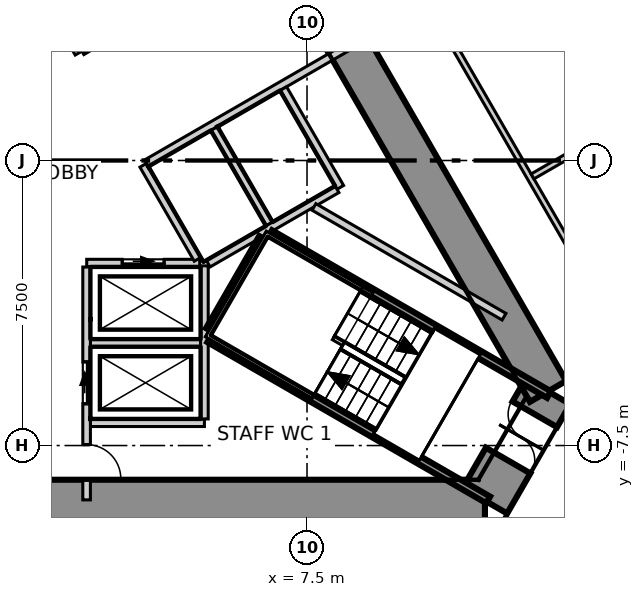
"""IFC4 building model, lengths in metres.
Left out: names, types, materials, properties, quantities, classifications, styles, units other than length and angle.
Written with IfcOpenShell. Run it as: python <this file> out.ifc"""

import sys

from ifc_helpers import new_model, si_unit, direction, frame, frame_2d, origin, place, context, subcontext, project, spatial, polyline, rectangle, outline, extrude, element, fill, save


model = new_model("IFC4")
c1 = context("Model", 3, precision=1e-05, world=origin(), true_north=direction((0.0, 1.0)))
c2 = subcontext(c1, "Body", "Model", "MODEL_VIEW")
j1 = project(units=[si_unit("LENGTHUNIT", "METRE"), si_unit("PLANEANGLEUNIT", "RADIAN")], contexts=[c1])
p1 = place(None, origin())
s1 = spatial("IfcSite", under=j1, at=p1, CompositionType="ELEMENT")
p2 = place(p1, origin())
s2 = spatial("IfcBuilding", under=s1, at=p2, CompositionType="ELEMENT")
p3 = place(p2, frame((0.0, 0.0, 95.3)))
s3 = spatial("IfcBuildingStorey", under=s2, at=p3, CompositionType="ELEMENT", Elevation=95.3)
p4 = place(p3, frame((-12.182, -8.95, -0.3), z_axis=(0.0, 0.0, 1.0), x_axis=(1.0, 0.0, 0.0)))
e1 = element("IfcWall", 1, at=p4, inside=s3, PredefinedType="SHEAR", context=c2, shape_type="SweptSolid", body=[
    extrude(outline(polyline([(-0.462, -0.55), (1.483, -0.55), (3.428, -0.55), (5.374, -0.55), (7.319, -0.55), (9.264, -0.55), (11.209, -0.55), (13.155, -0.55), (15.1, -0.55), (17.045, -0.55), (18.99, -0.55), (20.936, -0.55), (22.881, -0.55), (24.826, -0.55), (23.902, 0.55), (21.949, 0.55), (19.995, 0.55), (18.042, 0.55), (16.089, 0.55), (14.135, 0.55), (12.182, 0.55), (10.229, 0.55), (8.275, 0.55), (6.322, 0.55), (4.369, 0.55), (2.415, 0.55), (0.462, 0.55), (-0.462, -0.55)])), origin(), (0.0, 0.0, 1.0), 4.2),
])
p5 = place(p3, frame((12.182, -8.95, -0.3), z_axis=(0.0, 0.0, 1.0), x_axis=(0.500061949227, 0.865989634427, 0.0)))
e2 = element("IfcWall", 2, at=p5, inside=s3, PredefinedType="SHEAR", context=c2, shape_type="SweptSolid", body=[
    extrude(outline(polyline([(-0.245, -0.675), (1.66, -0.675), (3.565, -0.675), (3.075, 0.675), (1.66, 0.675), (0.245, 0.675), (-0.245, -0.675)])), origin(), (0.0, 0.0, 1.0), 4.2),
])
p6 = place(p5, frame((1.221, 0.0, 0.3)))
e3 = element("IfcOpeningElement", 3, at=p6, cuts=e2, PredefinedType="OPENING", context=c2, shape_type="SweptSolid", body=[
    extrude(rectangle(XDim=1.4, YDim=2.1, at=frame_2d((0.7, 1.05))), frame((0.0, 0.685, 0.0), z_axis=(0.0, -1.0, 0.0), x_axis=(1.0, 0.0, 0.0)), (0.0, 0.0, 1.0), 1.37),
])
p7 = place(p3, frame((13.842, -6.075, -0.3), z_axis=(0.0, 0.0, 1.0), x_axis=(-0.500003780125, 0.866023221317, 0.0)))
e4 = element("IfcWall", 4, at=p7, inside=s3, PredefinedType="SHEAR", context=c2, shape_type="SweptSolid", body=[
    extrude(outline(polyline([(-0.462, -0.55), (1.483, -0.55), (3.428, -0.55), (5.374, -0.55), (7.319, -0.55), (9.264, -0.55), (11.209, -0.55), (13.155, -0.55), (15.1, -0.55), (17.045, -0.55), (18.99, -0.55), (20.936, -0.55), (22.881, -0.55), (24.826, -0.55), (23.902, 0.55), (21.949, 0.55), (19.995, 0.55), (18.042, 0.55), (16.089, 0.55), (14.135, 0.55), (12.182, 0.55), (10.229, 0.55), (8.275, 0.55), (6.322, 0.55), (4.369, 0.55), (2.415, 0.55), (0.462, 0.55), (-0.462, -0.55)])), origin(), (0.0, 0.0, 1.0), 4.2),
])
p8 = place(p7, frame((11.426, 0.0, 0.3)))
e5 = element("IfcOpeningElement", 5, at=p8, cuts=e4, PredefinedType="OPENING", context=c2, shape_type="SweptSolid", body=[
    extrude(rectangle(XDim=1.8, YDim=2.1, at=frame_2d((0.9, 1.05))), frame((0.0, 0.56, 0.0), z_axis=(0.0, -1.0, 0.0), x_axis=(1.0, 0.0, 0.0)), (0.0, 0.0, 1.0), 1.12),
])
p9 = place(p3, frame((32.857, -15.235, 0.0), z_axis=(0.0, 0.0, 1.0), x_axis=(-0.500009108245, 0.866020145073, 0.0)))
e6 = element("IfcWall", 6, at=p9, inside=s3, PredefinedType="ELEMENTEDWALL", context=c2, shape_type="SweptSolid", body=[
    extrude(rectangle(XDim=59.225, YDim=0.2, at=frame_2d((29.613, 0.0))), origin(), (0.0, 0.0, 1.0), 3.9),
])
p10 = place(p9, frame((2.043, 0.0, 0.9)))
e7 = element("IfcOpeningElement", 7, at=p10, cuts=e6, PredefinedType="OPENING", context=c2, shape_type="SweptSolid", body=[
    extrude(rectangle(XDim=5.6, YDim=2.5, at=frame_2d((2.8, 1.25))), frame((0.0, 0.11, 0.0), z_axis=(0.0, -1.0, 0.0), x_axis=(1.0, 0.0, 0.0)), (0.0, 0.0, 1.0), 0.22),
])
p11 = place(p9, frame((9.123, 0.0, 0.9)))
e8 = element("IfcOpeningElement", 8, at=p11, cuts=e6, PredefinedType="OPENING", context=c2, shape_type="SweptSolid", body=[
    extrude(rectangle(XDim=5.6, YDim=2.5, at=frame_2d((2.8, 1.25))), frame((0.0, 0.11, 0.0), z_axis=(0.0, -1.0, 0.0), x_axis=(1.0, 0.0, 0.0)), (0.0, 0.0, 1.0), 0.22),
])
p12 = place(p9, frame((16.203, 0.0, 0.9)))
e9 = element("IfcOpeningElement", 9, at=p12, cuts=e6, PredefinedType="OPENING", context=c2, shape_type="SweptSolid", body=[
    extrude(rectangle(XDim=5.6, YDim=2.5, at=frame_2d((2.8, 1.25))), frame((0.0, 0.11, 0.0), z_axis=(0.0, -1.0, 0.0), x_axis=(1.0, 0.0, 0.0)), (0.0, 0.0, 1.0), 0.22),
])
p13 = place(p9, frame((23.282, 0.0, 0.9)))
e10 = element("IfcOpeningElement", 10, at=p13, cuts=e6, PredefinedType="OPENING", context=c2, shape_type="SweptSolid", body=[
    extrude(rectangle(XDim=5.6, YDim=2.5, at=frame_2d((2.8, 1.25))), frame((0.0, 0.11, 0.0), z_axis=(0.0, -1.0, 0.0), x_axis=(1.0, 0.0, 0.0)), (0.0, 0.0, 1.0), 0.22),
])
p14 = place(p9, frame((30.362, 0.0, 0.9)))
e11 = element("IfcOpeningElement", 11, at=p14, cuts=e6, PredefinedType="OPENING", context=c2, shape_type="SweptSolid", body=[
    extrude(rectangle(XDim=5.6, YDim=2.5, at=frame_2d((2.8, 1.25))), frame((0.0, 0.11, 0.0), z_axis=(0.0, -1.0, 0.0), x_axis=(1.0, 0.0, 0.0)), (0.0, 0.0, 1.0), 0.22),
])
p15 = place(p9, frame((37.442, 0.0, 0.9)))
e12 = element("IfcOpeningElement", 12, at=p15, cuts=e6, PredefinedType="OPENING", context=c2, shape_type="SweptSolid", body=[
    extrude(rectangle(XDim=5.6, YDim=2.5, at=frame_2d((2.8, 1.25))), frame((0.0, 0.11, 0.0), z_axis=(0.0, -1.0, 0.0), x_axis=(1.0, 0.0, 0.0)), (0.0, 0.0, 1.0), 0.22),
])
p16 = place(p9, frame((44.522, 0.0, 0.9)))
e13 = element("IfcOpeningElement", 13, at=p16, cuts=e6, PredefinedType="OPENING", context=c2, shape_type="SweptSolid", body=[
    extrude(rectangle(XDim=5.6, YDim=2.5, at=frame_2d((2.8, 1.25))), frame((0.0, 0.11, 0.0), z_axis=(0.0, -1.0, 0.0), x_axis=(1.0, 0.0, 0.0)), (0.0, 0.0, 1.0), 0.22),
])
p17 = place(p9, frame((51.602, 0.0, 0.9)))
e14 = element("IfcOpeningElement", 14, at=p17, cuts=e6, PredefinedType="OPENING", context=c2, shape_type="SweptSolid", body=[
    extrude(rectangle(XDim=5.6, YDim=2.5, at=frame_2d((2.8, 1.25))), frame((0.0, 0.11, 0.0), z_axis=(0.0, -1.0, 0.0), x_axis=(1.0, 0.0, 0.0)), (0.0, 0.0, 1.0), 0.22),
])
p18 = place(p3, frame((3.017, 17.475, 0.0), z_axis=(0.0, 0.0, 1.0), x_axis=(0.499977309191, -0.866038503933, 0.0)))
e15 = element("IfcWall", 15, at=p18, inside=s3, PredefinedType="PARTITIONING", context=c2, shape_type="SweptSolid", body=[
    extrude(rectangle(XDim=27.337, YDim=0.15, at=frame_2d((13.668, 0.0))), origin(), (0.0, 0.0, 1.0), 3.9),
])
p19 = place(p18, frame((23.421, 0.0, 0.0)))
e16 = element("IfcOpeningElement", 16, at=p19, cuts=e15, PredefinedType="OPENING", context=c2, shape_type="SweptSolid", body=[
    extrude(rectangle(XDim=1.2, YDim=2.1, at=frame_2d((0.6, 1.05))), frame((0.0, 0.085, 0.0), z_axis=(0.0, -1.0, 0.0), x_axis=(1.0, 0.0, 0.0)), (0.0, 0.0, 1.0), 0.17),
])
p20 = place(p18, frame((13.025, 0.0, 0.0)))
e17 = element("IfcOpeningElement", 17, at=p20, cuts=e15, PredefinedType="OPENING", context=c2, shape_type="SweptSolid", body=[
    extrude(rectangle(XDim=1.2, YDim=2.1, at=frame_2d((0.6, 1.05))), frame((0.0, 0.085, 0.0), z_axis=(0.0, -1.0, 0.0), x_axis=(1.0, 0.0, 0.0)), (0.0, 0.0, 1.0), 0.17),
])
p21 = place(p18, frame((2.629, 0.0, 0.0)))
e18 = element("IfcOpeningElement", 18, at=p21, cuts=e15, PredefinedType="OPENING", context=c2, shape_type="SweptSolid", body=[
    extrude(rectangle(XDim=1.2, YDim=2.1, at=frame_2d((0.6, 1.05))), frame((0.0, 0.085, 0.0), z_axis=(0.0, -1.0, 0.0), x_axis=(1.0, 0.0, 0.0)), (0.0, 0.0, 1.0), 0.17),
])
p22 = place(p3, frame((13.434, -0.419, 0.0), z_axis=(0.0, 0.0, 1.0), x_axis=(0.866018845103, 0.500011359798, 0.0)))
e19 = element("IfcWall", 19, at=p22, inside=s3, PredefinedType="PARTITIONING", context=c2, shape_type="SweptSolid", body=[
    extrude(rectangle(XDim=9.412, YDim=0.15, at=frame_2d((4.706, 0.0))), origin(), (0.0, 0.0, 1.0), 3.9),
])
p23 = place(p3, frame((1.8, -4.8, 0.0), z_axis=(0.0, 0.0, 1.0), x_axis=(1.0, 0.0, 0.0)))
e20 = element("IfcWall", 20, at=p23, inside=s3, PredefinedType="SOLIDWALL", context=c2, shape_type="SweptSolid", body=[
    extrude(rectangle(XDim=2.9, YDim=0.2, at=frame_2d((1.45, 0.0))), origin(), (0.0, 0.0, 1.0), 3.9),
])
p24 = place(p3, frame((1.8, -6.9, 0.0), z_axis=(0.0, 0.0, 1.0), x_axis=(1.0, 0.0, 0.0)))
e21 = element("IfcWall", 21, at=p24, inside=s3, PredefinedType="SOLIDWALL", context=c2, shape_type="SweptSolid", body=[
    extrude(rectangle(XDim=3.0, YDim=0.2, at=frame_2d((1.5, 0.0))), origin(), (0.0, 0.0, 1.0), 3.9),
])
p25 = place(p3, frame((1.703, -2.7, 0.0), z_axis=(0.0, 0.0, 1.0), x_axis=(1.0, 0.0, 0.0)))
e22 = element("IfcWall", 22, at=p25, inside=s3, PredefinedType="SOLIDWALL", context=c2, shape_type="SweptSolid", body=[
    extrude(rectangle(XDim=2.973, YDim=0.2, at=frame_2d((1.487, 0.0))), origin(), (0.0, 0.0, 1.0), 3.9),
])
p26 = place(p25, frame((0.936, 0.0, 0.0)))
e23 = element("IfcOpeningElement", 23, at=p26, cuts=e22, PredefinedType="OPENING", context=c2, shape_type="SweptSolid", body=[
    extrude(rectangle(XDim=1.1, YDim=2.1, at=frame_2d((0.55, 1.05))), frame((0.0, 0.11, 0.0), z_axis=(0.0, -1.0, 0.0), x_axis=(1.0, 0.0, 0.0)), (0.0, 0.0, 1.0), 0.22),
])
p27 = place(p3, frame((0.0, 5.4, 0.0), z_axis=(0.0, 0.0, 1.0), x_axis=(0.500103862429, -0.865965430478, 0.0)))
e24 = element("IfcWall", 24, at=p27, inside=s3, PredefinedType="SOLIDWALL", context=c2, shape_type="SweptSolid", body=[
    extrude(rectangle(XDim=2.973, YDim=0.2, at=frame_2d((1.487, 0.0))), origin(), (0.0, 0.0, 1.0), 3.9),
])
p28 = place(p27, frame((0.937, 0.0, 0.0)))
e25 = element("IfcOpeningElement", 25, at=p28, cuts=e24, PredefinedType="OPENING", context=c2, shape_type="SweptSolid", body=[
    extrude(rectangle(XDim=1.1, YDim=2.1, at=frame_2d((0.55, 1.05))), frame((0.0, 0.11, 0.0), z_axis=(0.0, -1.0, 0.0), x_axis=(1.0, 0.0, 0.0)), (0.0, 0.0, 1.0), 0.22),
])
p29 = place(p3, frame((3.19, -0.125, 0.0), z_axis=(0.0, 0.0, 1.0), x_axis=(0.499988658015, -0.866031951983, 0.0)))
e26 = element("IfcWall", 26, at=p29, inside=s3, PredefinedType="SOLIDWALL", context=c2, shape_type="SweptSolid", body=[
    extrude(rectangle(XDim=2.858, YDim=0.2, at=frame_2d((1.429, 0.0))), origin(), (0.0, 0.0, 1.0), 3.9),
])
p30 = place(p3, frame((1.578, 2.874, 0.0), z_axis=(0.0, 0.0, 1.0), x_axis=(0.866062167127, 0.499936318615, 0.0)))
e27 = element("IfcWall", 27, at=p30, inside=s3, PredefinedType="SOLIDWALL", context=c2, shape_type="SweptSolid", body=[
    extrude(rectangle(XDim=6.127, YDim=0.2, at=frame_2d((3.063, 0.0))), origin(), (0.0, 0.0, 1.0), 3.9),
])
p31 = place(p30, frame((2.496, 0.0, 0.0)))
e28 = element("IfcOpeningElement", 28, at=p31, cuts=e27, PredefinedType="OPENING", context=c2, shape_type="SweptSolid", body=[
    extrude(rectangle(XDim=1.1, YDim=2.1, at=frame_2d((0.55, 1.05))), frame((0.0, 0.11, 0.0), z_axis=(0.0, -1.0, 0.0), x_axis=(1.0, 0.0, 0.0)), (0.0, 0.0, 1.0), 0.22),
])
p32 = place(p30, frame((4.671, 0.0, 0.0)))
e29 = element("IfcOpeningElement", 29, at=p32, cuts=e27, PredefinedType="OPENING", context=c2, shape_type="SweptSolid", body=[
    extrude(rectangle(XDim=0.9, YDim=2.1, at=frame_2d((0.45, 1.05))), frame((0.0, 0.11, 0.0), z_axis=(0.0, -1.0, 0.0), x_axis=(1.0, 0.0, 0.0)), (0.0, 0.0, 1.0), 0.22),
])
p33 = place(p3, frame((1.7, -8.93, 0.0), z_axis=(0.0, 0.0, 1.0), x_axis=(0.0, 1.0, 0.0)))
e30 = element("IfcWall", 30, at=p33, inside=s3, PredefinedType="SOLIDWALL", context=c2, shape_type="SweptSolid", body=[
    extrude(rectangle(XDim=6.127, YDim=0.2, at=frame_2d((3.063, 0.0))), origin(), (0.0, 0.0, 1.0), 3.9),
])
p34 = place(p33, frame((2.53, 0.0, 0.0)))
e31 = element("IfcOpeningElement", 31, at=p34, cuts=e30, PredefinedType="OPENING", context=c2, shape_type="SweptSolid", body=[
    extrude(rectangle(XDim=1.1, YDim=2.1, at=frame_2d((0.55, 1.05))), frame((0.0, 0.11, 0.0), z_axis=(0.0, -1.0, 0.0), x_axis=(1.0, 0.0, 0.0)), (0.0, 0.0, 1.0), 0.22),
])
p35 = place(p33, frame((0.555, 0.0, 0.0)))
e32 = element("IfcOpeningElement", 32, at=p35, cuts=e30, PredefinedType="OPENING", context=c2, shape_type="SweptSolid", body=[
    extrude(rectangle(XDim=0.9, YDim=2.1, at=frame_2d((0.45, 1.05))), frame((0.0, 0.11, 0.0), z_axis=(0.0, -1.0, 0.0), x_axis=(1.0, 0.0, 0.0)), (0.0, 0.0, 1.0), 0.22),
])
p36 = place(p3, frame((4.8, -6.8, 0.0), z_axis=(0.0, 0.0, 1.0), x_axis=(0.0, 1.0, 0.0)))
e33 = element("IfcWall", 33, at=p36, inside=s3, PredefinedType="SOLIDWALL", context=c2, shape_type="SweptSolid", body=[
    extrude(rectangle(XDim=4.029, YDim=0.2, at=frame_2d((2.015, 0.0))), origin(), (0.0, 0.0, 1.0), 3.9),
])
p37 = place(p3, frame((3.278, -0.071, 0.0), z_axis=(0.0, 0.0, 1.0), x_axis=(0.865983187006, 0.500073114477, 0.0)))
e34 = element("IfcWall", 34, at=p37, inside=s3, PredefinedType="SOLIDWALL", context=c2, shape_type="SweptSolid", body=[
    extrude(rectangle(XDim=6.127, YDim=0.2, at=frame_2d((3.063, 0.0))), origin(), (0.0, 0.0, 1.0), 3.9),
])
p38 = place(p3, frame((6.876, 1.891, 0.0), z_axis=(0.0, 0.0, 1.0), x_axis=(0.499990139034, -0.866031096941, 0.0)))
e35 = element("IfcWall", 35, at=p38, inside=s3, PredefinedType="SOLIDWALL", context=c2, shape_type="SweptSolid", body=[
    extrude(rectangle(XDim=3.0, YDim=0.2, at=frame_2d((1.5, 0.0))), origin(), (0.0, 0.0, 1.0), 3.9),
])
p39 = place(p3, frame((5.057, 0.841, 0.0), z_axis=(0.0, 0.0, 1.0), x_axis=(0.50012328804, -0.865954211699, 0.0)))
e36 = element("IfcWall", 36, at=p39, inside=s3, PredefinedType="SOLIDWALL", context=c2, shape_type="SweptSolid", body=[
    extrude(rectangle(XDim=2.9, YDim=0.2, at=frame_2d((1.45, 0.0))), origin(), (0.0, 0.0, 1.0), 3.9),
])
p40 = place(p3, frame((4.9, -2.714, 0.0), z_axis=(0.0, 0.0, 1.0), x_axis=(0.865992350556, 0.500057245502, 0.0)))
e37 = element("IfcWall", 37, at=p40, inside=s3, PredefinedType="SOLIDWALL", context=c2, shape_type="SweptSolid", body=[
    extrude(rectangle(XDim=3.914, YDim=0.2, at=frame_2d((1.957, 0.0))), origin(), (0.0, 0.0, 1.0), 3.9),
])
p41 = place(p3, frame((7.683, -1.222, 0.0), z_axis=(0.0, 0.0, 1.0), x_axis=(0.865960281868, -0.500112777509, 0.0)))
e38 = element("IfcWall", 38, at=p41, inside=s3, PredefinedType="SOLIDWALL", context=c2, shape_type="SweptSolid", body=[
    extrude(rectangle(XDim=5.775, YDim=0.2, at=frame_2d((2.888, 0.0))), origin(), (0.0, 0.0, 1.0), 3.25),
])
p42 = place(p3, frame((4.929, -4.693, 0.0), z_axis=(0.0, 0.0, 1.0), x_axis=(0.866018130586, -0.500012597338, 0.0)))
e39 = element("IfcWall", 39, at=p42, inside=s3, PredefinedType="SOLIDWALL", context=c2, shape_type="SweptSolid", body=[
    extrude(rectangle(XDim=8.473, YDim=0.2, at=frame_2d((4.237, 0.0))), origin(), (0.0, 0.0, 1.0), 3.9),
])
p43 = place(p3, frame((4.929, -4.462, 0.0), z_axis=(0.0, 0.0, 1.0), x_axis=(0.500200581029, 0.865909567298, 0.0)))
e40 = element("IfcWall", 40, at=p43, inside=s3, PredefinedType="SOLIDWALL", context=c2, shape_type="SweptSolid", body=[
    extrude(rectangle(XDim=2.799, YDim=0.2, at=frame_2d((1.399, 0.0))), origin(), (0.0, 0.0, 1.0), 3.9),
])
p44 = place(p3, frame((6.529, -1.922, 0.0), z_axis=(0.0, 0.0, 1.0), x_axis=(0.866010926821, -0.500025073997, 0.0)))
e41 = element("IfcWall", 41, at=p44, inside=s3, PredefinedType="SOLIDWALL", context=c2, shape_type="SweptSolid", body=[
    extrude(rectangle(XDim=8.473, YDim=0.2, at=frame_2d((4.237, 0.0))), origin(), (0.0, 0.0, 1.0), 3.9),
])
p45 = place(p26, origin())
e42 = element("IfcDoor", 42, at=p45, inside=s3, OperationType="SLIDING_TO_LEFT", PredefinedType="DOOR", context=c2, shape_type="SweptSolid", body=[
    extrude(rectangle(XDim=1.1, YDim=2.1, at=frame_2d((0.55, 1.05))), frame((0.0, 0.025, 0.0), z_axis=(0.0, -1.0, 0.0), x_axis=(1.0, 0.0, 0.0)), (0.0, 0.0, 1.0), 0.05),
])
fill(e23, e42)
p46 = place(p34, origin())
e43 = element("IfcDoor", 43, at=p46, inside=s3, OperationType="SLIDING_TO_LEFT", PredefinedType="DOOR", context=c2, shape_type="SweptSolid", body=[
    extrude(rectangle(XDim=1.1, YDim=2.1, at=frame_2d((0.55, 1.05))), frame((0.0, 0.025, 0.0), z_axis=(0.0, -1.0, 0.0), x_axis=(1.0, 0.0, 0.0)), (0.0, 0.0, 1.0), 0.05),
])
fill(e31, e43)
p47 = place(p6, origin())
e44 = element("IfcDoor", 44, at=p47, inside=s3, OperationType="DOUBLE_DOOR_SINGLE_SWING", PredefinedType="DOOR", context=c2, shape_type="SweptSolid", body=[
    extrude(rectangle(XDim=1.4, YDim=2.1, at=frame_2d((0.7, 1.05))), frame((0.0, 0.025, 0.0), z_axis=(0.0, -1.0, 0.0), x_axis=(1.0, 0.0, 0.0)), (0.0, 0.0, 1.0), 0.05),
])
fill(e3, e44)
p48 = place(p35, origin())
e45 = element("IfcDoor", 45, at=p48, inside=s3, OperationType="SINGLE_SWING_LEFT", PredefinedType="DOOR", context=c2, shape_type="SweptSolid", body=[
    extrude(rectangle(XDim=0.9, YDim=2.1, at=frame_2d((0.45, 1.05))), frame((0.0, 0.025, 0.0), z_axis=(0.0, -1.0, 0.0), x_axis=(1.0, 0.0, 0.0)), (0.0, 0.0, 1.0), 0.05),
])
fill(e32, e45)
save(model, sys.argv[1])
